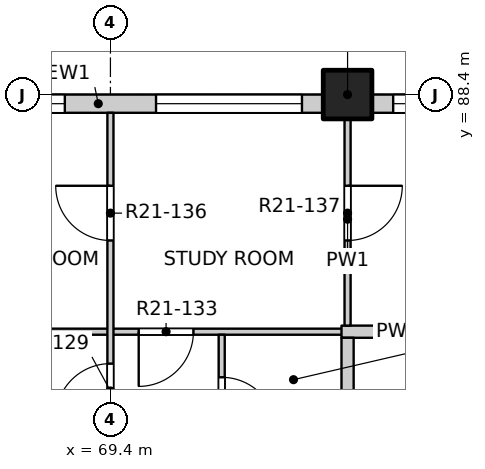
"""IFC4 building model, lengths in metres.
Left out: names, types, materials, properties, quantities, classifications, styles, units other than length and angle.
Written with IfcOpenShell. Run it as: python <this file> out.ifc"""

import sys

from ifc_helpers import new_model, si_unit, direction, frame, frame_2d, origin, origin_2d, place, context, subcontext, project, spatial, rectangle, extrude, element, fill, save


model = new_model("IFC4")
c1 = context("Model", 3, precision=1e-05, world=origin(), true_north=direction((0.0, 1.0)))
c2 = subcontext(c1, "Body", "Model", "MODEL_VIEW")
j1 = project(units=[si_unit("LENGTHUNIT", "METRE"), si_unit("PLANEANGLEUNIT", "RADIAN")], contexts=[c1])
p1 = place(None, origin())
s1 = spatial("IfcSite", under=j1, at=p1, CompositionType="ELEMENT")
p2 = place(p1, origin())
s2 = spatial("IfcBuilding", under=s1, at=p2, CompositionType="ELEMENT")
p3 = place(p2, frame((0.0, 0.0, 221.1)))
s3 = spatial("IfcBuildingStorey", under=s2, at=p3, CompositionType="ELEMENT", Elevation=221.1)
p4 = place(p3, frame((73.3, 88.4, -0.25), z_axis=(0.0, 0.0, 1.0), x_axis=(1.0, 0.0, 0.0)))
e1 = element("IfcColumn", 1, at=p4, inside=s3, PredefinedType="COLUMN", context=c2, shape_type="SweptSolid", body=[
    extrude(rectangle(XDim=0.8, YDim=0.8, at=origin_2d()), origin(), (0.0, 0.0, 1.0), 3.4),
])
p5 = place(p3, frame((65.5, 88.25, 0.0), z_axis=(0.0, 0.0, 1.0), x_axis=(1.0, 0.0, 0.0)))
e2 = element("IfcWall", 2, at=p5, inside=s3, PredefinedType="SOLIDWALL", context=c2, shape_type="SweptSolid", body=[
    extrude(rectangle(XDim=7.4, YDim=0.3, at=frame_2d((3.7, 0.0))), origin(), (0.0, 0.0, 1.0), 2.7),
])
p6 = place(p5, frame((0.75, 0.0, 0.9)))
e3 = element("IfcOpeningElement", 3, at=p6, cuts=e2, PredefinedType="OPENING", context=c2, shape_type="SweptSolid", body=[
    extrude(rectangle(XDim=2.4, YDim=1.8, at=frame_2d((1.2, 0.9))), frame((0.0, 0.16, 0.0), z_axis=(0.0, -1.0, 0.0), x_axis=(1.0, 0.0, 0.0)), (0.0, 0.0, 1.0), 0.32),
])
p7 = place(p5, frame((4.65, 0.0, 0.9)))
e4 = element("IfcOpeningElement", 4, at=p7, cuts=e2, PredefinedType="OPENING", context=c2, shape_type="SweptSolid", body=[
    extrude(rectangle(XDim=2.4, YDim=1.8, at=frame_2d((1.2, 0.9))), frame((0.0, 0.16, 0.0), z_axis=(0.0, -1.0, 0.0), x_axis=(1.0, 0.0, 0.0)), (0.0, 0.0, 1.0), 0.32),
])
p8 = place(p3, frame((73.7, 88.25, 0.0), z_axis=(0.0, 0.0, 1.0), x_axis=(1.0, 0.0, 0.0)))
e5 = element("IfcWall", 5, at=p8, inside=s3, PredefinedType="SOLIDWALL", context=c2, shape_type="SweptSolid", body=[
    extrude(rectangle(XDim=22.6, YDim=0.3, at=frame_2d((11.3, 0.0))), origin(), (0.0, 0.0, 1.0), 2.7),
])
p9 = place(p8, frame((0.35, 0.0, 0.9)))
e6 = element("IfcOpeningElement", 6, at=p9, cuts=e5, PredefinedType="OPENING", context=c2, shape_type="SweptSolid", body=[
    extrude(rectangle(XDim=2.4, YDim=1.8, at=frame_2d((1.2, 0.9))), frame((0.0, 0.16, 0.0), z_axis=(0.0, -1.0, 0.0), x_axis=(1.0, 0.0, 0.0)), (0.0, 0.0, 1.0), 0.32),
])
p10 = place(p8, frame((4.25, 0.0, 0.9)))
e7 = element("IfcOpeningElement", 7, at=p10, cuts=e5, PredefinedType="OPENING", context=c2, shape_type="SweptSolid", body=[
    extrude(rectangle(XDim=2.4, YDim=1.8, at=frame_2d((1.2, 0.9))), frame((0.0, 0.16, 0.0), z_axis=(0.0, -1.0, 0.0), x_axis=(1.0, 0.0, 0.0)), (0.0, 0.0, 1.0), 0.32),
])
p11 = place(p8, frame((8.15, 0.0, 0.9)))
e8 = element("IfcOpeningElement", 8, at=p11, cuts=e5, PredefinedType="OPENING", context=c2, shape_type="SweptSolid", body=[
    extrude(rectangle(XDim=2.4, YDim=1.8, at=frame_2d((1.2, 0.9))), frame((0.0, 0.16, 0.0), z_axis=(0.0, -1.0, 0.0), x_axis=(1.0, 0.0, 0.0)), (0.0, 0.0, 1.0), 0.32),
])
p12 = place(p8, frame((12.05, 0.0, 0.9)))
e9 = element("IfcOpeningElement", 9, at=p12, cuts=e5, PredefinedType="OPENING", context=c2, shape_type="SweptSolid", body=[
    extrude(rectangle(XDim=2.4, YDim=1.8, at=frame_2d((1.2, 0.9))), frame((0.0, 0.16, 0.0), z_axis=(0.0, -1.0, 0.0), x_axis=(1.0, 0.0, 0.0)), (0.0, 0.0, 1.0), 0.32),
])
p13 = place(p8, frame((15.95, 0.0, 0.9)))
e10 = element("IfcOpeningElement", 10, at=p13, cuts=e5, PredefinedType="OPENING", context=c2, shape_type="SweptSolid", body=[
    extrude(rectangle(XDim=2.4, YDim=1.8, at=frame_2d((1.2, 0.9))), frame((0.0, 0.16, 0.0), z_axis=(0.0, -1.0, 0.0), x_axis=(1.0, 0.0, 0.0)), (0.0, 0.0, 1.0), 0.32),
])
p14 = place(p8, frame((19.85, 0.0, 0.9)))
e11 = element("IfcOpeningElement", 11, at=p14, cuts=e5, PredefinedType="OPENING", context=c2, shape_type="SweptSolid", body=[
    extrude(rectangle(XDim=2.4, YDim=1.8, at=frame_2d((1.2, 0.9))), frame((0.0, 0.16, 0.0), z_axis=(0.0, -1.0, 0.0), x_axis=(1.0, 0.0, 0.0)), (0.0, 0.0, 1.0), 0.32),
])
p15 = place(p3, frame((61.9, 84.5, 0.0), z_axis=(0.0, 0.0, 1.0), x_axis=(1.0, 0.0, 0.0)))
e12 = element("IfcWall", 12, at=p15, inside=s3, PredefinedType="PARTITIONING", context=c2, shape_type="SweptSolid", body=[
    extrude(rectangle(XDim=11.5, YDim=0.1, at=frame_2d((5.75, 0.0))), origin(), (0.0, 0.0, 1.0), 3.15),
])
p16 = place(p15, frame((7.965, 0.0, 0.0)))
e13 = element("IfcOpeningElement", 13, at=p16, cuts=e12, PredefinedType="OPENING", context=c2, shape_type="SweptSolid", body=[
    extrude(rectangle(XDim=0.9, YDim=2.1, at=frame_2d((0.45, 1.05))), frame((0.0, 0.06, 0.0), z_axis=(0.0, -1.0, 0.0), x_axis=(1.0, 0.0, 0.0)), (0.0, 0.0, 1.0), 0.12),
])
p17 = place(p3, frame((73.2, 84.5, 0.0), z_axis=(0.0, 0.0, 1.0), x_axis=(1.0, 0.0, 0.0)))
e14 = element("IfcWall", 14, at=p17, inside=s3, PredefinedType="PARTITIONING", context=c2, shape_type="SweptSolid", body=[
    extrude(rectangle(XDim=1.85, YDim=0.2, at=frame_2d((0.925, 0.0))), origin(), (0.0, 0.0, 1.0), 3.15),
])
p18 = place(p3, frame((69.4, 41.9, 0.0), z_axis=(0.0, 0.0, 1.0), x_axis=(0.0, 1.0, 0.0)))
e15 = element("IfcWall", 15, at=p18, inside=s3, PredefinedType="PARTITIONING", context=c2, shape_type="SweptSolid", body=[
    extrude(rectangle(XDim=46.2, YDim=0.1, at=frame_2d((23.1, 0.0))), origin(), (0.0, 0.0, 1.0), 3.15),
])
p19 = place(p18, frame((1.2, 0.0, 0.0)))
e16 = element("IfcOpeningElement", 16, at=p19, cuts=e15, PredefinedType="OPENING", context=c2, shape_type="SweptSolid", body=[
    extrude(rectangle(XDim=0.9, YDim=2.1, at=frame_2d((0.45, 1.05))), frame((0.0, 0.06, 0.0), z_axis=(0.0, -1.0, 0.0), x_axis=(1.0, 0.0, 0.0)), (0.0, 0.0, 1.0), 0.12),
])
p20 = place(p18, frame((6.025, 0.0, 0.0)))
e17 = element("IfcOpeningElement", 17, at=p20, cuts=e15, PredefinedType="OPENING", context=c2, shape_type="SweptSolid", body=[
    extrude(rectangle(XDim=0.9, YDim=2.1, at=frame_2d((0.45, 1.05))), frame((0.0, 0.06, 0.0), z_axis=(0.0, -1.0, 0.0), x_axis=(1.0, 0.0, 0.0)), (0.0, 0.0, 1.0), 0.12),
])
p21 = place(p18, frame((9.0, 0.0, 0.0)))
e18 = element("IfcOpeningElement", 18, at=p21, cuts=e15, PredefinedType="OPENING", context=c2, shape_type="SweptSolid", body=[
    extrude(rectangle(XDim=0.9, YDim=2.1, at=frame_2d((0.45, 1.05))), frame((0.0, 0.06, 0.0), z_axis=(0.0, -1.0, 0.0), x_axis=(1.0, 0.0, 0.0)), (0.0, 0.0, 1.0), 0.12),
])
p22 = place(p18, frame((12.9, 0.0, 0.0)))
e19 = element("IfcOpeningElement", 19, at=p22, cuts=e15, PredefinedType="OPENING", context=c2, shape_type="SweptSolid", body=[
    extrude(rectangle(XDim=0.9, YDim=2.1, at=frame_2d((0.45, 1.05))), frame((0.0, 0.06, 0.0), z_axis=(0.0, -1.0, 0.0), x_axis=(1.0, 0.0, 0.0)), (0.0, 0.0, 1.0), 0.12),
])
p23 = place(p18, frame((17.775, 0.0, 0.0)))
e20 = element("IfcOpeningElement", 20, at=p23, cuts=e15, PredefinedType="OPENING", context=c2, shape_type="SweptSolid", body=[
    extrude(rectangle(XDim=0.9, YDim=2.1, at=frame_2d((0.45, 1.05))), frame((0.0, 0.06, 0.0), z_axis=(0.0, -1.0, 0.0), x_axis=(1.0, 0.0, 0.0)), (0.0, 0.0, 1.0), 0.12),
])
p24 = place(p18, frame((20.7, 0.0, 0.0)))
e21 = element("IfcOpeningElement", 21, at=p24, cuts=e15, PredefinedType="OPENING", context=c2, shape_type="SweptSolid", body=[
    extrude(rectangle(XDim=0.9, YDim=2.1, at=frame_2d((0.45, 1.05))), frame((0.0, 0.06, 0.0), z_axis=(0.0, -1.0, 0.0), x_axis=(1.0, 0.0, 0.0)), (0.0, 0.0, 1.0), 0.12),
])
p25 = place(p18, frame((24.6, 0.0, 0.0)))
e22 = element("IfcOpeningElement", 22, at=p25, cuts=e15, PredefinedType="OPENING", context=c2, shape_type="SweptSolid", body=[
    extrude(rectangle(XDim=0.9, YDim=2.1, at=frame_2d((0.45, 1.05))), frame((0.0, 0.06, 0.0), z_axis=(0.0, -1.0, 0.0), x_axis=(1.0, 0.0, 0.0)), (0.0, 0.0, 1.0), 0.12),
])
p26 = place(p18, frame((29.425, 0.0, 0.0)))
e23 = element("IfcOpeningElement", 23, at=p26, cuts=e15, PredefinedType="OPENING", context=c2, shape_type="SweptSolid", body=[
    extrude(rectangle(XDim=0.9, YDim=2.1, at=frame_2d((0.45, 1.05))), frame((0.0, 0.06, 0.0), z_axis=(0.0, -1.0, 0.0), x_axis=(1.0, 0.0, 0.0)), (0.0, 0.0, 1.0), 0.12),
])
p27 = place(p18, frame((33.375, 0.0, 0.0)))
e24 = element("IfcOpeningElement", 24, at=p27, cuts=e15, PredefinedType="OPENING", context=c2, shape_type="SweptSolid", body=[
    extrude(rectangle(XDim=0.9, YDim=2.1, at=frame_2d((0.45, 1.05))), frame((0.0, 0.06, 0.0), z_axis=(0.0, -1.0, 0.0), x_axis=(1.0, 0.0, 0.0)), (0.0, 0.0, 1.0), 0.12),
])
p28 = place(p18, frame((36.3, 0.0, 0.0)))
e25 = element("IfcOpeningElement", 25, at=p28, cuts=e15, PredefinedType="OPENING", context=c2, shape_type="SweptSolid", body=[
    extrude(rectangle(XDim=0.9, YDim=2.1, at=frame_2d((0.45, 1.05))), frame((0.0, 0.06, 0.0), z_axis=(0.0, -1.0, 0.0), x_axis=(1.0, 0.0, 0.0)), (0.0, 0.0, 1.0), 0.12),
])
p29 = place(p18, frame((41.175, 0.0, 0.0)))
e26 = element("IfcOpeningElement", 26, at=p29, cuts=e15, PredefinedType="OPENING", context=c2, shape_type="SweptSolid", body=[
    extrude(rectangle(XDim=0.9, YDim=2.1, at=frame_2d((0.45, 1.05))), frame((0.0, 0.06, 0.0), z_axis=(0.0, -1.0, 0.0), x_axis=(1.0, 0.0, 0.0)), (0.0, 0.0, 1.0), 0.12),
])
p30 = place(p18, frame((44.1, 0.0, 0.0)))
e27 = element("IfcOpeningElement", 27, at=p30, cuts=e15, PredefinedType="OPENING", context=c2, shape_type="SweptSolid", body=[
    extrude(rectangle(XDim=0.9, YDim=2.1, at=frame_2d((0.45, 1.05))), frame((0.0, 0.06, 0.0), z_axis=(0.0, -1.0, 0.0), x_axis=(1.0, 0.0, 0.0)), (0.0, 0.0, 1.0), 0.12),
])
p31 = place(p3, frame((71.23, 78.7, 0.0), z_axis=(0.0, 0.0, 1.0), x_axis=(0.0, 1.0, 0.0)))
e28 = element("IfcWall", 28, at=p31, inside=s3, PredefinedType="PARTITIONING", context=c2, shape_type="SweptSolid", body=[
    extrude(rectangle(XDim=5.75, YDim=0.1, at=frame_2d((2.875, 0.0))), origin(), (0.0, 0.0, 1.0), 3.15),
])
p32 = place(p31, frame((1.225, 0.0, 0.0)))
e29 = element("IfcOpeningElement", 29, at=p32, cuts=e28, PredefinedType="OPENING", context=c2, shape_type="SweptSolid", body=[
    extrude(rectangle(XDim=0.9, YDim=2.1, at=frame_2d((0.45, 1.05))), frame((0.0, 0.06, 0.0), z_axis=(0.0, -1.0, 0.0), x_axis=(1.0, 0.0, 0.0)), (0.0, 0.0, 1.0), 0.12),
])
p33 = place(p31, frame((4.15, 0.0, 0.0)))
e30 = element("IfcOpeningElement", 30, at=p33, cuts=e28, PredefinedType="OPENING", context=c2, shape_type="SweptSolid", body=[
    extrude(rectangle(XDim=0.9, YDim=2.1, at=frame_2d((0.45, 1.05))), frame((0.0, 0.06, 0.0), z_axis=(0.0, -1.0, 0.0), x_axis=(1.0, 0.0, 0.0)), (0.0, 0.0, 1.0), 0.12),
])
p34 = place(p3, frame((73.3, 49.5, 0.0), z_axis=(0.0, 0.0, 1.0), x_axis=(0.0, 1.0, 0.0)))
e31 = element("IfcWall", 31, at=p34, inside=s3, PredefinedType="PARTITIONING", context=c2, shape_type="SweptSolid", body=[
    extrude(rectangle(XDim=34.9, YDim=0.2, at=frame_2d((17.45, 0.0))), origin(), (0.0, 0.0, 1.0), 3.15),
])
p35 = place(p34, frame((3.325, 0.0, 0.0)))
e32 = element("IfcOpeningElement", 32, at=p35, cuts=e31, PredefinedType="OPENING", context=c2, shape_type="SweptSolid", body=[
    extrude(rectangle(XDim=1.0, YDim=2.1, at=frame_2d((0.5, 1.05))), frame((0.0, 0.11, 0.0), z_axis=(0.0, -1.0, 0.0), x_axis=(1.0, 0.0, 0.0)), (0.0, 0.0, 1.0), 0.22),
])
p36 = place(p34, frame((18.875, 0.0, 0.0)))
e33 = element("IfcOpeningElement", 33, at=p36, cuts=e31, PredefinedType="OPENING", context=c2, shape_type="SweptSolid", body=[
    extrude(rectangle(XDim=1.0, YDim=2.1, at=frame_2d((0.5, 1.05))), frame((0.0, 0.11, 0.0), z_axis=(0.0, -1.0, 0.0), x_axis=(1.0, 0.0, 0.0)), (0.0, 0.0, 1.0), 0.22),
])
p37 = place(p34, frame((29.325, 0.0, 0.0)))
e34 = element("IfcOpeningElement", 34, at=p37, cuts=e31, PredefinedType="OPENING", context=c2, shape_type="SweptSolid", body=[
    extrude(rectangle(XDim=1.0, YDim=2.1, at=frame_2d((0.5, 1.05))), frame((0.0, 0.11, 0.0), z_axis=(0.0, -1.0, 0.0), x_axis=(1.0, 0.0, 0.0)), (0.0, 0.0, 1.0), 0.22),
])
p38 = place(p3, frame((73.3, 84.6, 0.0), z_axis=(0.0, 0.0, 1.0), x_axis=(0.0, 1.0, 0.0)))
e35 = element("IfcWall", 35, at=p38, inside=s3, PredefinedType="PARTITIONING", context=c2, shape_type="SweptSolid", body=[
    extrude(rectangle(XDim=3.5, YDim=0.1, at=frame_2d((1.75, 0.0))), origin(), (0.0, 0.0, 1.0), 3.15),
])
p39 = place(p38, frame((1.4, 0.0, 0.0)))
e36 = element("IfcOpeningElement", 36, at=p39, cuts=e35, PredefinedType="OPENING", context=c2, shape_type="SweptSolid", body=[
    extrude(rectangle(XDim=0.9, YDim=2.1, at=frame_2d((0.45, 1.05))), frame((0.0, 0.06, 0.0), z_axis=(0.0, -1.0, 0.0), x_axis=(1.0, 0.0, 0.0)), (0.0, 0.0, 1.0), 0.12),
])
p40 = place(p6, origin())
e37 = element("IfcWindow", 37, at=p40, inside=s3, PartitioningType="DOUBLE_PANEL_VERTICAL", PredefinedType="WINDOW", context=c2, shape_type="SweptSolid", body=[
    extrude(rectangle(XDim=2.4, YDim=1.8, at=frame_2d((1.2, 0.9))), frame((0.0, 0.03, 0.0), z_axis=(0.0, -1.0, 0.0), x_axis=(1.0, 0.0, 0.0)), (0.0, 0.0, 1.0), 0.06),
])
fill(e3, e37)
p41 = place(p7, origin())
e38 = element("IfcWindow", 38, at=p41, inside=s3, PartitioningType="DOUBLE_PANEL_VERTICAL", PredefinedType="WINDOW", context=c2, shape_type="SweptSolid", body=[
    extrude(rectangle(XDim=2.4, YDim=1.8, at=frame_2d((1.2, 0.9))), frame((0.0, 0.03, 0.0), z_axis=(0.0, -1.0, 0.0), x_axis=(1.0, 0.0, 0.0)), (0.0, 0.0, 1.0), 0.06),
])
fill(e4, e38)
p42 = place(p9, origin())
e39 = element("IfcWindow", 39, at=p42, inside=s3, PartitioningType="DOUBLE_PANEL_VERTICAL", PredefinedType="WINDOW", context=c2, shape_type="SweptSolid", body=[
    extrude(rectangle(XDim=2.4, YDim=1.8, at=frame_2d((1.2, 0.9))), frame((0.0, 0.03, 0.0), z_axis=(0.0, -1.0, 0.0), x_axis=(1.0, 0.0, 0.0)), (0.0, 0.0, 1.0), 0.06),
])
fill(e6, e39)
p43 = place(p33, origin())
e40 = element("IfcDoor", 40, at=p43, inside=s3, OperationType="SINGLE_SWING_RIGHT", PredefinedType="DOOR", context=c2, shape_type="SweptSolid", body=[
    extrude(rectangle(XDim=0.9, YDim=2.1, at=frame_2d((0.45, 1.05))), frame((0.0, 0.025, 0.0), z_axis=(0.0, -1.0, 0.0), x_axis=(1.0, 0.0, 0.0)), (0.0, 0.0, 1.0), 0.05),
])
fill(e30, e40)
p44 = place(p29, origin())
e41 = element("IfcDoor", 41, at=p44, inside=s3, OperationType="SINGLE_SWING_LEFT", PredefinedType="DOOR", context=c2, shape_type="SweptSolid", body=[
    extrude(rectangle(XDim=0.9, YDim=2.1, at=frame_2d((0.45, 1.05))), frame((0.0, 0.025, 0.0), z_axis=(0.0, -1.0, 0.0), x_axis=(1.0, 0.0, 0.0)), (0.0, 0.0, 1.0), 0.05),
])
fill(e26, e41)
p45 = place(p16, origin())
e42 = element("IfcDoor", 42, at=p45, inside=s3, OperationType="SINGLE_SWING_RIGHT", PredefinedType="DOOR", context=c2, shape_type="SweptSolid", body=[
    extrude(rectangle(XDim=0.9, YDim=2.1, at=frame_2d((0.45, 1.05))), frame((0.0, 0.025, 0.0), z_axis=(0.0, -1.0, 0.0), x_axis=(1.0, 0.0, 0.0)), (0.0, 0.0, 1.0), 0.05),
])
fill(e13, e42)
p46 = place(p30, origin())
e43 = element("IfcDoor", 43, at=p46, inside=s3, OperationType="SINGLE_SWING_RIGHT", PredefinedType="DOOR", context=c2, shape_type="SweptSolid", body=[
    extrude(rectangle(XDim=0.9, YDim=2.1, at=frame_2d((0.45, 1.05))), frame((0.0, 0.025, 0.0), z_axis=(0.0, -1.0, 0.0), x_axis=(1.0, 0.0, 0.0)), (0.0, 0.0, 1.0), 0.05),
])
fill(e27, e43)
p47 = place(p39, origin())
e44 = element("IfcDoor", 44, at=p47, inside=s3, OperationType="SINGLE_SWING_LEFT", PredefinedType="DOOR", context=c2, shape_type="SweptSolid", body=[
    extrude(rectangle(XDim=0.9, YDim=2.1, at=frame_2d((0.45, 1.05))), frame((0.0, 0.025, 0.0), z_axis=(0.0, -1.0, 0.0), x_axis=(1.0, 0.0, 0.0)), (0.0, 0.0, 1.0), 0.05),
])
fill(e36, e44)
save(model, sys.argv[1])
